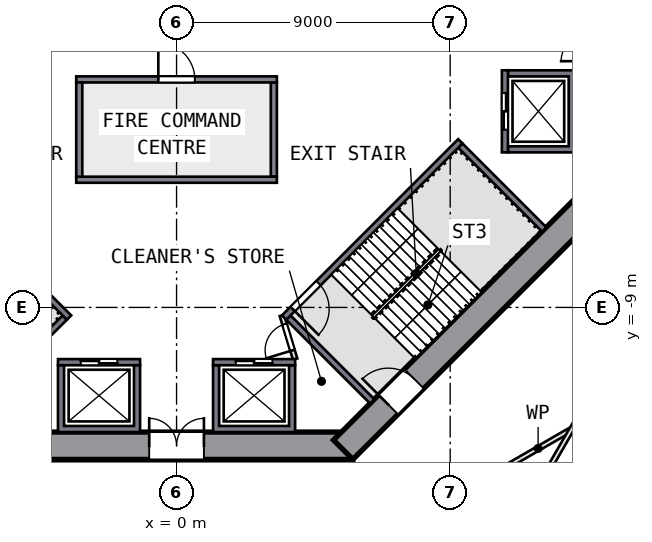
"""IFC4 building model, lengths in metres.
Left out: names, types, materials, properties, quantities, classifications, styles, units other than length and angle.
Written with IfcOpenShell. Run it as: python <this file> out.ifc"""

import sys

from ifc_helpers import new_model, si_unit, direction, frame, frame_2d, origin, place, context, subcontext, project, spatial, polyline, rectangle, outline, extrude, element, fill, save


model = new_model("IFC4")
c1 = context("Model", 3, precision=1e-05, world=origin(), true_north=direction((0.0, 1.0)))
c2 = subcontext(c1, "Body", "Model", "MODEL_VIEW")
j1 = project(units=[si_unit("LENGTHUNIT", "METRE"), si_unit("PLANEANGLEUNIT", "RADIAN")], contexts=[c1])
p1 = place(None, origin())
s1 = spatial("IfcSite", under=j1, at=p1, CompositionType="ELEMENT")
p2 = place(p1, origin())
s2 = spatial("IfcBuilding", under=s1, at=p2, CompositionType="ELEMENT")
p3 = place(p2, origin())
s3 = spatial("IfcBuildingStorey", under=s2, at=p3, CompositionType="ELEMENT", Elevation=0.0)
p4 = place(p3, frame((-5.799, -13.55, 0.0), z_axis=(0.0, 0.0, 1.0), x_axis=(1.0, 0.0, 0.0)))
e1 = element("IfcWall", 1, at=p4, inside=s3, PredefinedType="SHEAR", context=c2, shape_type="SweptSolid", body=[
    extrude(rectangle(XDim=11.598, YDim=0.9, at=frame_2d((5.799, 0.0))), origin(), (0.0, 0.0, 1.0), 8.0),
])
p5 = place(p4, frame((4.899, 0.0, 0.0)))
e2 = element("IfcOpeningElement", 2, at=p5, cuts=e1, PredefinedType="OPENING", context=c2, shape_type="SweptSolid", body=[
    extrude(rectangle(XDim=1.8, YDim=2.1, at=frame_2d((0.9, 1.05))), frame((0.0, 0.46, 0.0), z_axis=(0.0, -1.0, 0.0), x_axis=(1.0, 0.0, 0.0)), (0.0, 0.0, 1.0), 0.92),
])
p6 = place(p3, frame((5.481, -13.682, 0.0), z_axis=(0.0, 0.0, 1.0), x_axis=(0.707106781, 0.707106781, 0.0)))
e3 = element("IfcWall", 3, at=p6, inside=s3, PredefinedType="SHEAR", context=c2, shape_type="SweptSolid", body=[
    extrude(rectangle(XDim=11.598, YDim=0.9, at=frame_2d((5.799, 0.0))), origin(), (0.0, 0.0, 1.0), 8.0),
])
p7 = place(p6, frame((2.099, 0.0, 0.0)))
e4 = element("IfcOpeningElement", 4, at=p7, cuts=e3, PredefinedType="OPENING", context=c2, shape_type="SweptSolid", body=[
    extrude(rectangle(XDim=1.2, YDim=2.1, at=frame_2d((0.6, 1.05))), frame((0.0, 0.46, 0.0), z_axis=(0.0, -1.0, 0.0), x_axis=(1.0, 0.0, 0.0)), (0.0, 0.0, 1.0), 0.92),
])
p8 = place(p3, origin())
e5 = element("IfcWall", 5, at=p8, inside=s3, PredefinedType="SOLIDWALL", context=c2, shape_type="SweptSolid", body=[
    extrude(outline(polyline([(13.1, -3.9), (10.9, -3.9), (10.9, -3.7), (12.9, -3.7), (12.9, -1.4), (10.9, -1.4), (10.9, -1.2), (13.1, -1.2), (13.1, -3.9)])), origin(), (0.0, 0.0, 1.0), 7.55),
])
p9 = place(p3, frame((10.8, -1.2, 0.0), z_axis=(0.0, 0.0, 1.0), x_axis=(0.0, -1.0, 0.0)))
e6 = element("IfcWall", 6, at=p9, inside=s3, PredefinedType="SOLIDWALL", context=c2, shape_type="SweptSolid", body=[
    extrude(rectangle(XDim=2.7, YDim=0.2, at=frame_2d((1.35, 0.0))), origin(), (0.0, 0.0, 1.0), 7.55),
])
p10 = place(p9, frame((0.75, 0.0, 0.0)))
e7 = element("IfcOpeningElement", 7, at=p10, cuts=e6, PredefinedType="OPENING", context=c2, shape_type="SweptSolid", body=[
    extrude(rectangle(XDim=1.2, YDim=2.1, at=frame_2d((0.6, 1.05))), frame((0.0, 0.11, 0.0), z_axis=(0.0, -1.0, 0.0), x_axis=(1.0, 0.0, 0.0)), (0.0, 0.0, 1.0), 0.22),
])
p11 = place(p3, origin())
e8 = element("IfcWall", 8, at=p11, inside=s3, PredefinedType="SOLIDWALL", context=c2, shape_type="SweptSolid", body=[
    extrude(outline(polyline([(-3.9, -13.1), (-3.9, -10.9), (-3.7, -10.9), (-3.7, -12.9), (-1.4, -12.9), (-1.4, -10.9), (-1.2, -10.9), (-1.2, -13.1), (-3.9, -13.1)])), origin(), (0.0, 0.0, 1.0), 7.55),
])
p12 = place(p3, frame((-1.2, -10.8, 0.0), z_axis=(0.0, 0.0, 1.0), x_axis=(-1.0, 0.0, 0.0)))
e9 = element("IfcWall", 9, at=p12, inside=s3, PredefinedType="SOLIDWALL", context=c2, shape_type="SweptSolid", body=[
    extrude(rectangle(XDim=2.7, YDim=0.2, at=frame_2d((1.35, 0.0))), origin(), (0.0, 0.0, 1.0), 7.55),
])
p13 = place(p12, frame((0.75, 0.0, 0.0)))
e10 = element("IfcOpeningElement", 10, at=p13, cuts=e9, PredefinedType="OPENING", context=c2, shape_type="SweptSolid", body=[
    extrude(rectangle(XDim=1.2, YDim=2.1, at=frame_2d((0.6, 1.05))), frame((0.0, 0.11, 0.0), z_axis=(0.0, -1.0, 0.0), x_axis=(1.0, 0.0, 0.0)), (0.0, 0.0, 1.0), 0.22),
])
p14 = place(p3, origin())
e11 = element("IfcWall", 11, at=p14, inside=s3, PredefinedType="SOLIDWALL", context=c2, shape_type="SweptSolid", body=[
    extrude(outline(polyline([(1.2, -10.9), (1.4, -10.9), (1.4, -12.9), (3.7, -12.9), (3.7, -10.9), (3.9, -10.9), (3.9, -13.1), (1.2, -13.1), (1.2, -10.9)])), origin(), (0.0, 0.0, 1.0), 7.55),
])
p15 = place(p3, frame((1.2, -10.8, 0.0), z_axis=(0.0, 0.0, 1.0), x_axis=(1.0, 0.0, 0.0)))
e12 = element("IfcWall", 12, at=p15, inside=s3, PredefinedType="SOLIDWALL", context=c2, shape_type="SweptSolid", body=[
    extrude(rectangle(XDim=2.7, YDim=0.2, at=frame_2d((1.35, 0.0))), origin(), (0.0, 0.0, 1.0), 7.55),
])
p16 = place(p15, frame((0.75, 0.0, 0.0)))
e13 = element("IfcOpeningElement", 13, at=p16, cuts=e12, PredefinedType="OPENING", context=c2, shape_type="SweptSolid", body=[
    extrude(rectangle(XDim=1.2, YDim=2.1, at=frame_2d((0.6, 1.05))), frame((0.0, 0.11, 0.0), z_axis=(0.0, -1.0, 0.0), x_axis=(1.0, 0.0, 0.0)), (0.0, 0.0, 1.0), 0.22),
])
p17 = place(p3, frame((-3.535, -9.334, 0.0), z_axis=(0.0, 0.0, 1.0), x_axis=(-0.707106781, 0.707106781, 0.0)))
e14 = element("IfcWall", 14, at=p17, inside=s3, PredefinedType="SOLIDWALL", context=c2, shape_type="SweptSolid", body=[
    extrude(rectangle(XDim=8.2, YDim=0.2, at=frame_2d((4.1, 0.0))), origin(), (0.0, 0.0, 1.0), 7.55),
])
p18 = place(p17, frame((6.6, 0.0, 0.0)))
e15 = element("IfcOpeningElement", 15, at=p18, cuts=e14, PredefinedType="OPENING", context=c2, shape_type="SweptSolid", body=[
    extrude(rectangle(XDim=1.2, YDim=2.1, at=frame_2d((0.6, 1.05))), frame((0.0, 0.11, 0.0), z_axis=(0.0, -1.0, 0.0), x_axis=(1.0, 0.0, 0.0)), (0.0, 0.0, 1.0), 0.22),
])
p19 = place(p3, frame((-3.677, -9.334, 0.0), z_axis=(0.0, 0.0, 1.0), x_axis=(-0.707106781, -0.707106781, 0.0)))
e16 = element("IfcWall", 16, at=p19, inside=s3, PredefinedType="SOLIDWALL", context=c2, shape_type="SweptSolid", body=[
    extrude(rectangle(XDim=3.9, YDim=0.2, at=frame_2d((1.95, 0.0))), origin(), (0.0, 0.0, 1.0), 7.55),
])
p20 = place(p3, frame((9.334, -3.535, 0.0), z_axis=(0.0, 0.0, 1.0), x_axis=(-0.707106781, -0.707106781, 0.0)))
e17 = element("IfcWall", 17, at=p20, inside=s3, PredefinedType="SOLIDWALL", context=c2, shape_type="SweptSolid", body=[
    extrude(rectangle(XDim=8.2, YDim=0.2, at=frame_2d((4.1, 0.0))), origin(), (0.0, 0.0, 1.0), 7.55),
])
p21 = place(p20, frame((6.6, 0.0, 0.0)))
e18 = element("IfcOpeningElement", 18, at=p21, cuts=e17, PredefinedType="OPENING", context=c2, shape_type="SweptSolid", body=[
    extrude(rectangle(XDim=1.2, YDim=2.1, at=frame_2d((0.6, 1.05))), frame((0.0, 0.11, 0.0), z_axis=(0.0, -1.0, 0.0), x_axis=(1.0, 0.0, 0.0)), (0.0, 0.0, 1.0), 0.22),
])
for number, where, z_axis, x_axis in (
    (19, (3.677, -9.334, 0.0), (0.0, 0.0, 1.0), (0.707, -0.707, 0.0)),
    (20, (9.334, -3.677, 0.0), (0.0, 0.0, 1.0), (0.707, -0.707, 0.0)),
):
    element("IfcWall", number, at=place(p3, frame(where, z_axis=z_axis, x_axis=x_axis)), inside=s3, PredefinedType="SOLIDWALL", context=c2, shape_type="SweptSolid", body=[
        extrude(rectangle(XDim=3.9, YDim=0.2, at=frame_2d((1.95, 0.0))), origin(), (0.0, 0.0, 1.0), 7.55),
    ])
p22 = place(p3, frame((3.9, -10.7, 0.0), z_axis=(0.0, 0.0, 1.0), x_axis=(-0.289808785, 0.957084567, 0.0)))
e21 = element("IfcWall", 21, at=p22, inside=s3, PredefinedType="PARTITIONING", context=c2, shape_type="SweptSolid", body=[
    extrude(rectangle(XDim=1.501, YDim=0.15, at=frame_2d((0.75, 0.0))), origin(), (0.0, 0.0, 1.0), 7.55),
])
p23 = place(p22, frame((0.301, 0.0, 0.0)))
e22 = element("IfcOpeningElement", 22, at=p23, cuts=e21, PredefinedType="OPENING", context=c2, shape_type="SweptSolid", body=[
    extrude(rectangle(XDim=0.9, YDim=2.1, at=frame_2d((0.45, 1.05))), frame((0.0, 0.085, 0.0), z_axis=(0.0, -1.0, 0.0), x_axis=(1.0, 0.0, 0.0)), (0.0, 0.0, 1.0), 0.17),
])
p24 = place(p3, frame((-3.3, -4.8, 0.0), z_axis=(0.0, 0.0, 1.0), x_axis=(1.0, 0.0, 0.0)))
e23 = element("IfcWall", 23, at=p24, inside=s3, PredefinedType="SOLIDWALL", context=c2, shape_type="SweptSolid", body=[
    extrude(rectangle(XDim=6.6, YDim=0.2, at=frame_2d((3.3, 0.0))), origin(), (0.0, 0.0, 1.0), 3.4),
])
for number, where, z_axis, x_axis in (
    (24, (-3.2, -4.7, 0.0), (0.0, 0.0, 1.0), (0.0, 1.0, 0.0)),
    (25, (3.2, -4.7, 0.0), (0.0, 0.0, 1.0), (0.0, 1.0, 0.0)),
):
    element("IfcWall", number, at=place(p3, frame(where, z_axis=z_axis, x_axis=x_axis)), inside=s3, PredefinedType="SOLIDWALL", context=c2, shape_type="SweptSolid", body=[
        extrude(rectangle(XDim=3.1, YDim=0.2, at=frame_2d((1.55, 0.0))), origin(), (0.0, 0.0, 1.0), 3.4),
    ])
p25 = place(p3, frame((-3.3, -1.5, 0.0), z_axis=(0.0, 0.0, 1.0), x_axis=(1.0, 0.0, 0.0)))
e26 = element("IfcWall", 26, at=p25, inside=s3, PredefinedType="SOLIDWALL", context=c2, shape_type="SweptSolid", body=[
    extrude(rectangle(XDim=6.6, YDim=0.2, at=frame_2d((3.3, 0.0))), origin(), (0.0, 0.0, 1.0), 3.4),
])
p26 = place(p25, frame((2.7, 0.0, 0.0)))
e27 = element("IfcOpeningElement", 27, at=p26, cuts=e26, PredefinedType="OPENING", context=c2, shape_type="SweptSolid", body=[
    extrude(rectangle(XDim=1.2, YDim=2.1, at=frame_2d((0.6, 1.05))), frame((0.0, 0.11, 0.0), z_axis=(0.0, -1.0, 0.0), x_axis=(1.0, 0.0, 0.0)), (0.0, 0.0, 1.0), 0.22),
])
p27 = place(p3, frame((12.935, -13.038, 0.0), z_axis=(0.0, 0.0, 1.0), x_axis=(-0.866064057, -0.499933044, 0.0)))
e28 = element("IfcWall", 28, at=p27, inside=s3, PredefinedType="PARTITIONING", context=c2, shape_type="SweptSolid", body=[
    extrude(rectangle(XDim=2.408, YDim=0.15, at=frame_2d((1.204, 0.0))), origin(), (0.0, 0.0, 1.0), 7.55),
])
p28 = place(p3, frame((14.592, -10.243, 0.0), z_axis=(0.0, 0.0, 1.0), x_axis=(-0.500011342, -0.866018855, 0.0)))
e29 = element("IfcWall", 29, at=p28, inside=s3, PredefinedType="PARTITIONING", context=c2, shape_type="SweptSolid", body=[
    extrude(rectangle(XDim=4.95, YDim=0.15, at=frame_2d((2.475, 0.0))), origin(), (0.0, 0.0, 1.0), 7.55),
])
p29 = place(p10, origin())
e30 = element("IfcDoor", 30, at=p29, inside=s3, OperationType="DOUBLE_DOOR_SLIDING", PredefinedType="DOOR", context=c2, shape_type="SweptSolid", body=[
    extrude(rectangle(XDim=1.2, YDim=2.1, at=frame_2d((0.6, 1.05))), frame((0.0, 0.025, 0.0), z_axis=(0.0, -1.0, 0.0), x_axis=(1.0, 0.0, 0.0)), (0.0, 0.0, 1.0), 0.05),
])
fill(e7, e30)
p30 = place(p13, origin())
e31 = element("IfcDoor", 31, at=p30, inside=s3, OperationType="DOUBLE_DOOR_SLIDING", PredefinedType="DOOR", context=c2, shape_type="SweptSolid", body=[
    extrude(rectangle(XDim=1.2, YDim=2.1, at=frame_2d((0.6, 1.05))), frame((0.0, 0.025, 0.0), z_axis=(0.0, -1.0, 0.0), x_axis=(1.0, 0.0, 0.0)), (0.0, 0.0, 1.0), 0.05),
])
fill(e10, e31)
p31 = place(p16, origin())
e32 = element("IfcDoor", 32, at=p31, inside=s3, OperationType="DOUBLE_DOOR_SLIDING", PredefinedType="DOOR", context=c2, shape_type="SweptSolid", body=[
    extrude(rectangle(XDim=1.2, YDim=2.1, at=frame_2d((0.6, 1.05))), frame((0.0, 0.025, 0.0), z_axis=(0.0, -1.0, 0.0), x_axis=(1.0, 0.0, 0.0)), (0.0, 0.0, 1.0), 0.05),
])
fill(e13, e32)
p32 = place(p21, origin())
e33 = element("IfcDoor", 33, at=p32, inside=s3, OperationType="SINGLE_SWING_RIGHT", PredefinedType="DOOR", context=c2, shape_type="SweptSolid", body=[
    extrude(rectangle(XDim=1.2, YDim=2.1, at=frame_2d((0.6, 1.05))), frame((0.0, 0.025, 0.0), z_axis=(0.0, -1.0, 0.0), x_axis=(1.0, 0.0, 0.0)), (0.0, 0.0, 1.0), 0.05),
])
fill(e18, e33)
p33 = place(p5, origin())
e34 = element("IfcDoor", 34, at=p33, inside=s3, OperationType="DOUBLE_DOOR_SINGLE_SWING", PredefinedType="DOOR", context=c2, shape_type="SweptSolid", body=[
    extrude(rectangle(XDim=1.8, YDim=2.1, at=frame_2d((0.9, 1.05))), frame((0.0, 0.025, 0.0), z_axis=(0.0, -1.0, 0.0), x_axis=(1.0, 0.0, 0.0)), (0.0, 0.0, 1.0), 0.05),
])
fill(e2, e34)
p34 = place(p7, origin())
e35 = element("IfcDoor", 35, at=p34, inside=s3, OperationType="SINGLE_SWING_LEFT", PredefinedType="DOOR", context=c2, shape_type="SweptSolid", body=[
    extrude(rectangle(XDim=1.2, YDim=2.1, at=frame_2d((0.6, 1.05))), frame((0.0, 0.025, 0.0), z_axis=(0.0, -1.0, 0.0), x_axis=(1.0, 0.0, 0.0)), (0.0, 0.0, 1.0), 0.05),
])
fill(e4, e35)
p35 = place(p23, origin())
e36 = element("IfcDoor", 36, at=p35, inside=s3, OperationType="SINGLE_SWING_LEFT", PredefinedType="DOOR", context=c2, shape_type="SweptSolid", body=[
    extrude(rectangle(XDim=0.9, YDim=2.1, at=frame_2d((0.45, 1.05))), frame((0.0, 0.025, 0.0), z_axis=(0.0, -1.0, 0.0), x_axis=(1.0, 0.0, 0.0)), (0.0, 0.0, 1.0), 0.05),
])
fill(e22, e36)
p36 = place(p26, origin())
e37 = element("IfcDoor", 37, at=p36, inside=s3, OperationType="SINGLE_SWING_LEFT", PredefinedType="DOOR", context=c2, shape_type="SweptSolid", body=[
    extrude(rectangle(XDim=1.2, YDim=2.1, at=frame_2d((0.6, 1.05))), frame((0.0, 0.025, 0.0), z_axis=(0.0, -1.0, 0.0), x_axis=(1.0, 0.0, 0.0)), (0.0, 0.0, 1.0), 0.05),
])
fill(e27, e37)
save(model, sys.argv[1])
